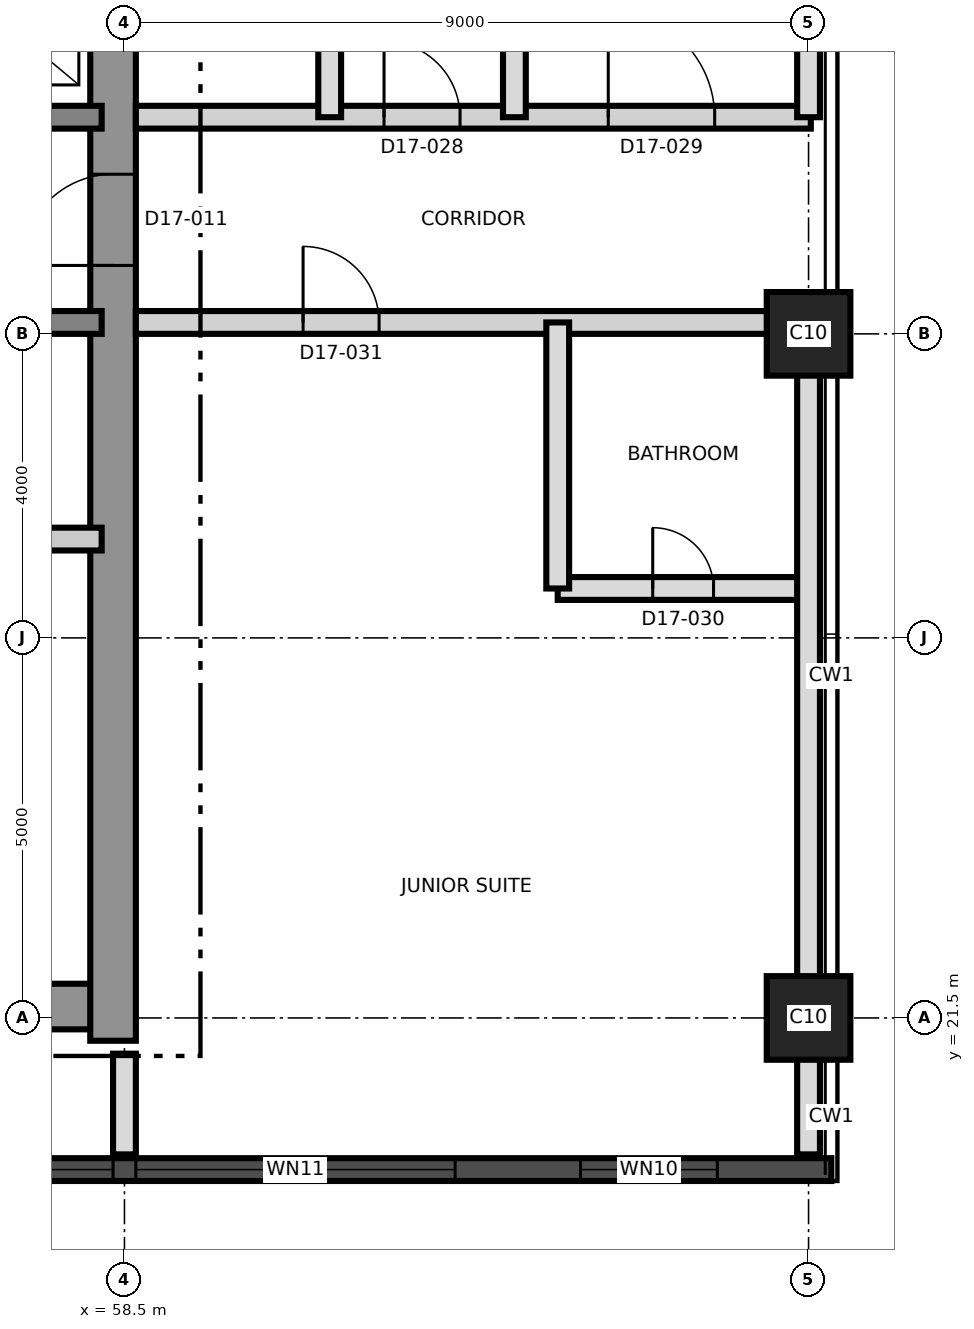
"""IFC4 building model, lengths in metres.
Left out: names, types, materials, properties, quantities, classifications, styles, units other than length and angle.
Written with IfcOpenShell. Run it as: python <this file> out.ifc"""

import sys

from ifc_helpers import new_model, si_unit, direction, frame, frame_2d, origin, origin_2d, place, context, subcontext, project, spatial, rectangle, extrude, element, fill, save


model = new_model("IFC4")
c1 = context("Model", 3, precision=1e-05, world=origin(), true_north=direction((0.0, 1.0)))
c2 = subcontext(c1, "Body", "Model", "MODEL_VIEW")
j1 = project(units=[si_unit("LENGTHUNIT", "METRE"), si_unit("PLANEANGLEUNIT", "RADIAN")], contexts=[c1])
p1 = place(None, origin())
s1 = spatial("IfcSite", under=j1, at=p1, CompositionType="ELEMENT")
p2 = place(p1, origin())
s2 = spatial("IfcBuilding", under=s1, at=p2, CompositionType="ELEMENT")
p3 = place(p2, frame((0.0, 0.0, 171.8)))
s3 = spatial("IfcBuildingStorey", under=s2, at=p3, CompositionType="ELEMENT", Elevation=171.8)
p4 = place(p3, frame((31.2, 21.65, 0.0), z_axis=(0.0, 0.0, 1.0), x_axis=(1.0, 0.0, 0.0)))
e1 = element("IfcWall", 1, at=p4, inside=s3, PredefinedType="SHEAR", context=c2, shape_type="SweptSolid", body=[
    extrude(rectangle(XDim=27.0, YDim=0.6, at=frame_2d((13.5, 0.0))), origin(), (0.0, 0.0, 1.0), 3.7),
])
p5 = place(p3, frame((58.35, 21.2, 0.0), z_axis=(0.0, 0.0, 1.0), x_axis=(0.0, 1.0, 0.0)))
e2 = element("IfcWall", 2, at=p5, inside=s3, PredefinedType="SHEAR", context=c2, shape_type="SweptSolid", body=[
    extrude(rectangle(XDim=18.6, YDim=0.6, at=frame_2d((9.3, 0.0))), origin(), (0.0, 0.0, 1.0), 3.7),
])
p6 = place(p5, frame((10.2, 0.0, 0.0)))
e3 = element("IfcOpeningElement", 3, at=p6, cuts=e2, PredefinedType="OPENING", context=c2, shape_type="SweptSolid", body=[
    extrude(rectangle(XDim=1.2, YDim=2.1, at=frame_2d((0.6, 1.05))), frame((0.0, 0.31, 0.0), z_axis=(0.0, -1.0, 0.0), x_axis=(1.0, 0.0, 0.0)), (0.0, 0.0, 1.0), 0.62),
])
p7 = place(p3, frame((31.8, 30.65, 0.0), z_axis=(0.0, 0.0, 1.0), x_axis=(1.0, 0.0, 0.0)))
e4 = element("IfcWall", 4, at=p7, inside=s3, PredefinedType="SHEAR", context=c2, shape_type="SweptSolid", body=[
    extrude(rectangle(XDim=26.4, YDim=0.3, at=frame_2d((13.2, 0.0))), origin(), (0.0, 0.0, 1.0), 3.7),
])
p8 = place(p7, frame((24.7, 0.0, 0.0)))
e5 = element("IfcOpeningElement", 5, at=p8, cuts=e4, PredefinedType="OPENING", context=c2, shape_type="SweptSolid", body=[
    extrude(rectangle(XDim=1.0, YDim=2.1, at=frame_2d((0.5, 1.05))), frame((0.0, 0.16, 0.0), z_axis=(0.0, -1.0, 0.0), x_axis=(1.0, 0.0, 0.0)), (0.0, 0.0, 1.0), 0.32),
])
p9 = place(p7, frame((4.0, 0.0, 0.0)))
e6 = element("IfcOpeningElement", 6, at=p9, cuts=e4, PredefinedType="OPENING", context=c2, shape_type="SweptSolid", body=[
    extrude(rectangle(XDim=1.0, YDim=2.1, at=frame_2d((0.5, 1.05))), frame((0.0, 0.16, 0.0), z_axis=(0.0, -1.0, 0.0), x_axis=(1.0, 0.0, 0.0)), (0.0, 0.0, 1.0), 0.32),
])
p10 = place(p3, frame((31.8, 33.35, 0.0), z_axis=(0.0, 0.0, 1.0), x_axis=(1.0, 0.0, 0.0)))
e7 = element("IfcWall", 7, at=p10, inside=s3, PredefinedType="SHEAR", context=c2, shape_type="SweptSolid", body=[
    extrude(rectangle(XDim=26.4, YDim=0.3, at=frame_2d((13.2, 0.0))), origin(), (0.0, 0.0, 1.0), 3.7),
])
p11 = place(p10, frame((13.85, 0.0, 0.0)))
e8 = element("IfcOpeningElement", 8, at=p11, cuts=e7, PredefinedType="OPENING", context=c2, shape_type="SweptSolid", body=[
    extrude(rectangle(XDim=1.4, YDim=2.1, at=frame_2d((0.7, 1.05))), frame((0.0, 0.16, 0.0), z_axis=(0.0, -1.0, 0.0), x_axis=(1.0, 0.0, 0.0)), (0.0, 0.0, 1.0), 0.32),
])
p12 = place(p10, frame((5.325, 0.0, 0.0)))
e9 = element("IfcOpeningElement", 9, at=p12, cuts=e7, PredefinedType="OPENING", context=c2, shape_type="SweptSolid", body=[
    extrude(rectangle(XDim=1.2, YDim=2.1, at=frame_2d((0.6, 1.05))), frame((0.0, 0.16, 0.0), z_axis=(0.0, -1.0, 0.0), x_axis=(1.0, 0.0, 0.0)), (0.0, 0.0, 1.0), 0.32),
])
p13 = place(p10, frame((19.875, 0.0, 0.0)))
e10 = element("IfcOpeningElement", 10, at=p13, cuts=e7, PredefinedType="OPENING", context=c2, shape_type="SweptSolid", body=[
    extrude(rectangle(XDim=1.2, YDim=2.1, at=frame_2d((0.6, 1.05))), frame((0.0, 0.16, 0.0), z_axis=(0.0, -1.0, 0.0), x_axis=(1.0, 0.0, 0.0)), (0.0, 0.0, 1.0), 0.32),
])
for number, where, z_axis, x_axis in (
    (11, (67.5, 21.5, 0.0), (0.0, 0.0, 1.0), (1.0, 0.0, 0.0)),
    (12, (67.5, 30.5, 0.0), (0.0, 0.0, 1.0), (1.0, 0.0, 0.0)),
):
    element("IfcColumn", number, at=place(p3, frame(where, z_axis=z_axis, x_axis=x_axis)), inside=s3, PredefinedType="COLUMN", context=c2, shape_type="SweptSolid", body=[
        extrude(rectangle(XDim=1.1, YDim=1.1, at=origin_2d()), origin(), (0.0, 0.0, 1.0), 3.7),
    ])
p14 = place(p3, frame((44.01, 19.505, 0.0), z_axis=(0.0, 0.0, 1.0), x_axis=(1.0, 0.0, 0.0)))
e13 = element("IfcWall", 13, at=p14, inside=s3, PredefinedType="SOLIDWALL", context=c2, shape_type="SweptSolid", body=[
    extrude(rectangle(XDim=23.79, YDim=0.3, at=frame_2d((11.895, 0.0))), origin(), (0.0, 0.0, 1.0), 3.4),
])
p15 = place(p14, frame((1.845, 0.0, 0.3)))
e14 = element("IfcOpeningElement", 14, at=p15, cuts=e13, PredefinedType="OPENING", context=c2, shape_type="SweptSolid", body=[
    extrude(rectangle(XDim=1.8, YDim=2.4, at=frame_2d((0.9, 1.2))), frame((0.0, 0.16, 0.0), z_axis=(0.0, -1.0, 0.0), x_axis=(1.0, 0.0, 0.0)), (0.0, 0.0, 1.0), 0.32),
])
p16 = place(p14, frame((5.64, 0.0, 0.9)))
e15 = element("IfcOpeningElement", 15, at=p16, cuts=e13, PredefinedType="OPENING", context=c2, shape_type="SweptSolid", body=[
    extrude(rectangle(XDim=4.2, YDim=1.5, at=frame_2d((2.1, 0.75))), frame((0.0, 0.16, 0.0), z_axis=(0.0, -1.0, 0.0), x_axis=(1.0, 0.0, 0.0)), (0.0, 0.0, 1.0), 0.32),
])
p17 = place(p14, frame((10.14, 0.0, 0.9)))
e16 = element("IfcOpeningElement", 16, at=p17, cuts=e13, PredefinedType="OPENING", context=c2, shape_type="SweptSolid", body=[
    extrude(rectangle(XDim=4.2, YDim=1.5, at=frame_2d((2.1, 0.75))), frame((0.0, 0.16, 0.0), z_axis=(0.0, -1.0, 0.0), x_axis=(1.0, 0.0, 0.0)), (0.0, 0.0, 1.0), 0.32),
])
p18 = place(p14, frame((14.64, 0.0, 0.9)))
e17 = element("IfcOpeningElement", 17, at=p18, cuts=e13, PredefinedType="OPENING", context=c2, shape_type="SweptSolid", body=[
    extrude(rectangle(XDim=4.2, YDim=1.5, at=frame_2d((2.1, 0.75))), frame((0.0, 0.16, 0.0), z_axis=(0.0, -1.0, 0.0), x_axis=(1.0, 0.0, 0.0)), (0.0, 0.0, 1.0), 0.32),
])
p19 = place(p14, frame((20.49, 0.0, 0.3)))
e18 = element("IfcOpeningElement", 18, at=p19, cuts=e13, PredefinedType="OPENING", context=c2, shape_type="SweptSolid", body=[
    extrude(rectangle(XDim=1.8, YDim=2.4, at=frame_2d((0.9, 1.2))), frame((0.0, 0.16, 0.0), z_axis=(0.0, -1.0, 0.0), x_axis=(1.0, 0.0, 0.0)), (0.0, 0.0, 1.0), 0.32),
])
p20 = place(p3, frame((55.8, 27.8, 0.0), z_axis=(0.0, 0.0, 1.0), x_axis=(1.0, 0.0, 0.0)))
e19 = element("IfcWall", 19, at=p20, inside=s3, PredefinedType="PARTITIONING", context=c2, shape_type="SweptSolid", body=[
    extrude(rectangle(XDim=2.4, YDim=0.3, at=frame_2d((1.2, 0.0))), origin(), (0.0, 0.0, 1.0), 3.4),
])
p21 = place(p20, frame((0.75, 0.0, 0.0)))
e20 = element("IfcOpeningElement", 20, at=p21, cuts=e19, PredefinedType="OPENING", context=c2, shape_type="SweptSolid", body=[
    extrude(rectangle(XDim=0.9, YDim=2.1, at=frame_2d((0.45, 1.05))), frame((0.0, 0.16, 0.0), z_axis=(0.0, -1.0, 0.0), x_axis=(1.0, 0.0, 0.0)), (0.0, 0.0, 1.0), 0.32),
])
p22 = place(p3, frame((64.2, 27.15, 0.0), z_axis=(0.0, 0.0, 1.0), x_axis=(1.0, 0.0, 0.0)))
e21 = element("IfcWall", 21, at=p22, inside=s3, PredefinedType="PARTITIONING", context=c2, shape_type="SweptSolid", body=[
    extrude(rectangle(XDim=3.3, YDim=0.3, at=frame_2d((1.65, 0.0))), origin(), (0.0, 0.0, 1.0), 3.4),
])
p23 = place(p22, frame((1.25, 0.0, 0.0)))
e22 = element("IfcOpeningElement", 22, at=p23, cuts=e21, PredefinedType="OPENING", context=c2, shape_type="SweptSolid", body=[
    extrude(rectangle(XDim=0.8, YDim=2.1, at=frame_2d((0.4, 1.05))), frame((0.0, 0.16, 0.0), z_axis=(0.0, -1.0, 0.0), x_axis=(1.0, 0.0, 0.0)), (0.0, 0.0, 1.0), 0.32),
])
p24 = place(p3, frame((58.65, 30.65, 0.0), z_axis=(0.0, 0.0, 1.0), x_axis=(1.0, 0.0, 0.0)))
e23 = element("IfcWall", 23, at=p24, inside=s3, PredefinedType="PARTITIONING", context=c2, shape_type="SweptSolid", body=[
    extrude(rectangle(XDim=8.88, YDim=0.3, at=frame_2d((4.44, 0.0))), origin(), (0.0, 0.0, 1.0), 3.4),
])
p25 = place(p24, frame((2.2, 0.0, 0.0)))
e24 = element("IfcOpeningElement", 24, at=p25, cuts=e23, PredefinedType="OPENING", context=c2, shape_type="SweptSolid", body=[
    extrude(rectangle(XDim=1.0, YDim=2.4, at=frame_2d((0.5, 1.2))), frame((0.0, 0.16, 0.0), z_axis=(0.0, -1.0, 0.0), x_axis=(1.0, 0.0, 0.0)), (0.0, 0.0, 1.0), 0.32),
])
p26 = place(p3, frame((58.65, 33.35, 0.0), z_axis=(0.0, 0.0, 1.0), x_axis=(1.0, 0.0, 0.0)))
e25 = element("IfcWall", 25, at=p26, inside=s3, PredefinedType="PARTITIONING", context=c2, shape_type="SweptSolid", body=[
    extrude(rectangle(XDim=8.88, YDim=0.3, at=frame_2d((4.44, 0.0))), origin(), (0.0, 0.0, 1.0), 3.4),
])
p27 = place(p26, frame((3.265, 0.0, 0.0)))
e26 = element("IfcOpeningElement", 26, at=p27, cuts=e25, PredefinedType="OPENING", context=c2, shape_type="SweptSolid", body=[
    extrude(rectangle(XDim=1.0, YDim=2.1, at=frame_2d((0.5, 1.05))), frame((0.0, 0.16, 0.0), z_axis=(0.0, -1.0, 0.0), x_axis=(1.0, 0.0, 0.0)), (0.0, 0.0, 1.0), 0.32),
])
p28 = place(p26, frame((6.215, 0.0, 0.0)))
e27 = element("IfcOpeningElement", 27, at=p28, cuts=e25, PredefinedType="OPENING", context=c2, shape_type="SweptSolid", body=[
    extrude(rectangle(XDim=1.4, YDim=2.1, at=frame_2d((0.7, 1.05))), frame((0.0, 0.16, 0.0), z_axis=(0.0, -1.0, 0.0), x_axis=(1.0, 0.0, 0.0)), (0.0, 0.0, 1.0), 0.32),
])
p29 = place(p3, frame((58.5, 19.705, 0.0), z_axis=(0.0, 0.0, 1.0), x_axis=(0.0, 1.0, 0.0)))
e28 = element("IfcWall", 28, at=p29, inside=s3, PredefinedType="PARTITIONING", context=c2, shape_type="SweptSolid", body=[
    extrude(rectangle(XDim=1.325, YDim=0.3, at=frame_2d((0.663, 0.0))), origin(), (0.0, 0.0, 1.0), 3.4),
])
p30 = place(p3, frame((61.2, 33.35, 0.0), z_axis=(0.0, 0.0, 1.0), x_axis=(0.0, 1.0, 0.0)))
e29 = element("IfcWall", 29, at=p30, inside=s3, PredefinedType="PARTITIONING", context=c2, shape_type="SweptSolid", body=[
    extrude(rectangle(XDim=3.2, YDim=0.3, at=frame_2d((1.6, 0.0))), origin(), (0.0, 0.0, 1.0), 3.4),
])
p31 = place(p3, frame((63.63, 33.35, 0.0), z_axis=(0.0, 0.0, 1.0), x_axis=(0.0, 1.0, 0.0)))
e30 = element("IfcWall", 30, at=p31, inside=s3, PredefinedType="PARTITIONING", context=c2, shape_type="SweptSolid", body=[
    extrude(rectangle(XDim=8.125, YDim=0.3, at=frame_2d((4.062, 0.0))), origin(), (0.0, 0.0, 1.0), 3.4),
])
p32 = place(p3, frame((64.2, 27.15, 0.0), z_axis=(0.0, 0.0, 1.0), x_axis=(0.0, 1.0, 0.0)))
e31 = element("IfcWall", 31, at=p32, inside=s3, PredefinedType="PARTITIONING", context=c2, shape_type="SweptSolid", body=[
    extrude(rectangle(XDim=3.5, YDim=0.3, at=frame_2d((1.75, 0.0))), origin(), (0.0, 0.0, 1.0), 3.4),
])
p33 = place(p3, frame((67.5, 19.705, 0.0), z_axis=(0.0, 0.0, 1.0), x_axis=(0.0, 1.0, 0.0)))
e32 = element("IfcWall", 32, at=p33, inside=s3, PredefinedType="PARTITIONING", context=c2, shape_type="SweptSolid", body=[
    extrude(rectangle(XDim=10.945, YDim=0.3, at=frame_2d((5.472, 0.0))), origin(), (0.0, 0.0, 1.0), 3.4),
])
p34 = place(p3, frame((67.5, 33.35, 0.0), z_axis=(0.0, 0.0, 1.0), x_axis=(0.0, 1.0, 0.0)))
e33 = element("IfcWall", 33, at=p34, inside=s3, PredefinedType="PARTITIONING", context=c2, shape_type="SweptSolid", body=[
    extrude(rectangle(XDim=8.125, YDim=0.3, at=frame_2d((4.062, 0.0))), origin(), (0.0, 0.0, 1.0), 3.4),
])
p35 = place(p17, origin())
e34 = element("IfcWindow", 34, at=p35, inside=s3, PartitioningType="SINGLE_PANEL", PredefinedType="WINDOW", context=c2, shape_type="SweptSolid", body=[
    extrude(rectangle(XDim=4.2, YDim=1.5, at=frame_2d((2.1, 0.75))), frame((0.0, 0.03, 0.0), z_axis=(0.0, -1.0, 0.0), x_axis=(1.0, 0.0, 0.0)), (0.0, 0.0, 1.0), 0.06),
])
fill(e16, e34)
p36 = place(p18, origin())
e35 = element("IfcWindow", 35, at=p36, inside=s3, PartitioningType="SINGLE_PANEL", PredefinedType="WINDOW", context=c2, shape_type="SweptSolid", body=[
    extrude(rectangle(XDim=4.2, YDim=1.5, at=frame_2d((2.1, 0.75))), frame((0.0, 0.03, 0.0), z_axis=(0.0, -1.0, 0.0), x_axis=(1.0, 0.0, 0.0)), (0.0, 0.0, 1.0), 0.06),
])
fill(e17, e35)
p37 = place(p19, origin())
e36 = element("IfcWindow", 36, at=p37, inside=s3, PartitioningType="SINGLE_PANEL", PredefinedType="WINDOW", context=c2, shape_type="SweptSolid", body=[
    extrude(rectangle(XDim=1.8, YDim=2.4, at=frame_2d((0.9, 1.2))), frame((0.0, 0.03, 0.0), z_axis=(0.0, -1.0, 0.0), x_axis=(1.0, 0.0, 0.0)), (0.0, 0.0, 1.0), 0.06),
])
fill(e18, e36)
p38 = place(p6, origin())
e37 = element("IfcDoor", 37, at=p38, inside=s3, OperationType="SINGLE_SWING_LEFT", PredefinedType="DOOR", context=c2, shape_type="SweptSolid", body=[
    extrude(rectangle(XDim=1.2, YDim=2.1, at=frame_2d((0.6, 1.05))), frame((0.0, 0.025, 0.0), z_axis=(0.0, -1.0, 0.0), x_axis=(1.0, 0.0, 0.0)), (0.0, 0.0, 1.0), 0.05),
])
fill(e3, e37)
p39 = place(p27, origin())
e38 = element("IfcDoor", 38, at=p39, inside=s3, OperationType="SINGLE_SWING_LEFT", PredefinedType="DOOR", context=c2, shape_type="SweptSolid", body=[
    extrude(rectangle(XDim=1.0, YDim=2.1, at=frame_2d((0.5, 1.05))), frame((0.0, 0.025, 0.0), z_axis=(0.0, -1.0, 0.0), x_axis=(1.0, 0.0, 0.0)), (0.0, 0.0, 1.0), 0.05),
])
fill(e26, e38)
p40 = place(p28, origin())
e39 = element("IfcDoor", 39, at=p40, inside=s3, OperationType="SINGLE_SWING_RIGHT", PredefinedType="DOOR", context=c2, shape_type="SweptSolid", body=[
    extrude(rectangle(XDim=1.4, YDim=2.1, at=frame_2d((0.7, 1.05))), frame((0.0, 0.025, 0.0), z_axis=(0.0, -1.0, 0.0), x_axis=(1.0, 0.0, 0.0)), (0.0, 0.0, 1.0), 0.05),
])
fill(e27, e39)
p41 = place(p23, origin())
e40 = element("IfcDoor", 40, at=p41, inside=s3, OperationType="SINGLE_SWING_LEFT", PredefinedType="DOOR", context=c2, shape_type="SweptSolid", body=[
    extrude(rectangle(XDim=0.8, YDim=2.1, at=frame_2d((0.4, 1.05))), frame((0.0, 0.025, 0.0), z_axis=(0.0, -1.0, 0.0), x_axis=(1.0, 0.0, 0.0)), (0.0, 0.0, 1.0), 0.05),
])
fill(e22, e40)
p42 = place(p25, origin())
e41 = element("IfcDoor", 41, at=p42, inside=s3, OperationType="SINGLE_SWING_LEFT", PredefinedType="DOOR", context=c2, shape_type="SweptSolid", body=[
    extrude(rectangle(XDim=1.0, YDim=2.4, at=frame_2d((0.5, 1.2))), frame((0.0, 0.025, 0.0), z_axis=(0.0, -1.0, 0.0), x_axis=(1.0, 0.0, 0.0)), (0.0, 0.0, 1.0), 0.05),
])
fill(e24, e41)
save(model, sys.argv[1])
